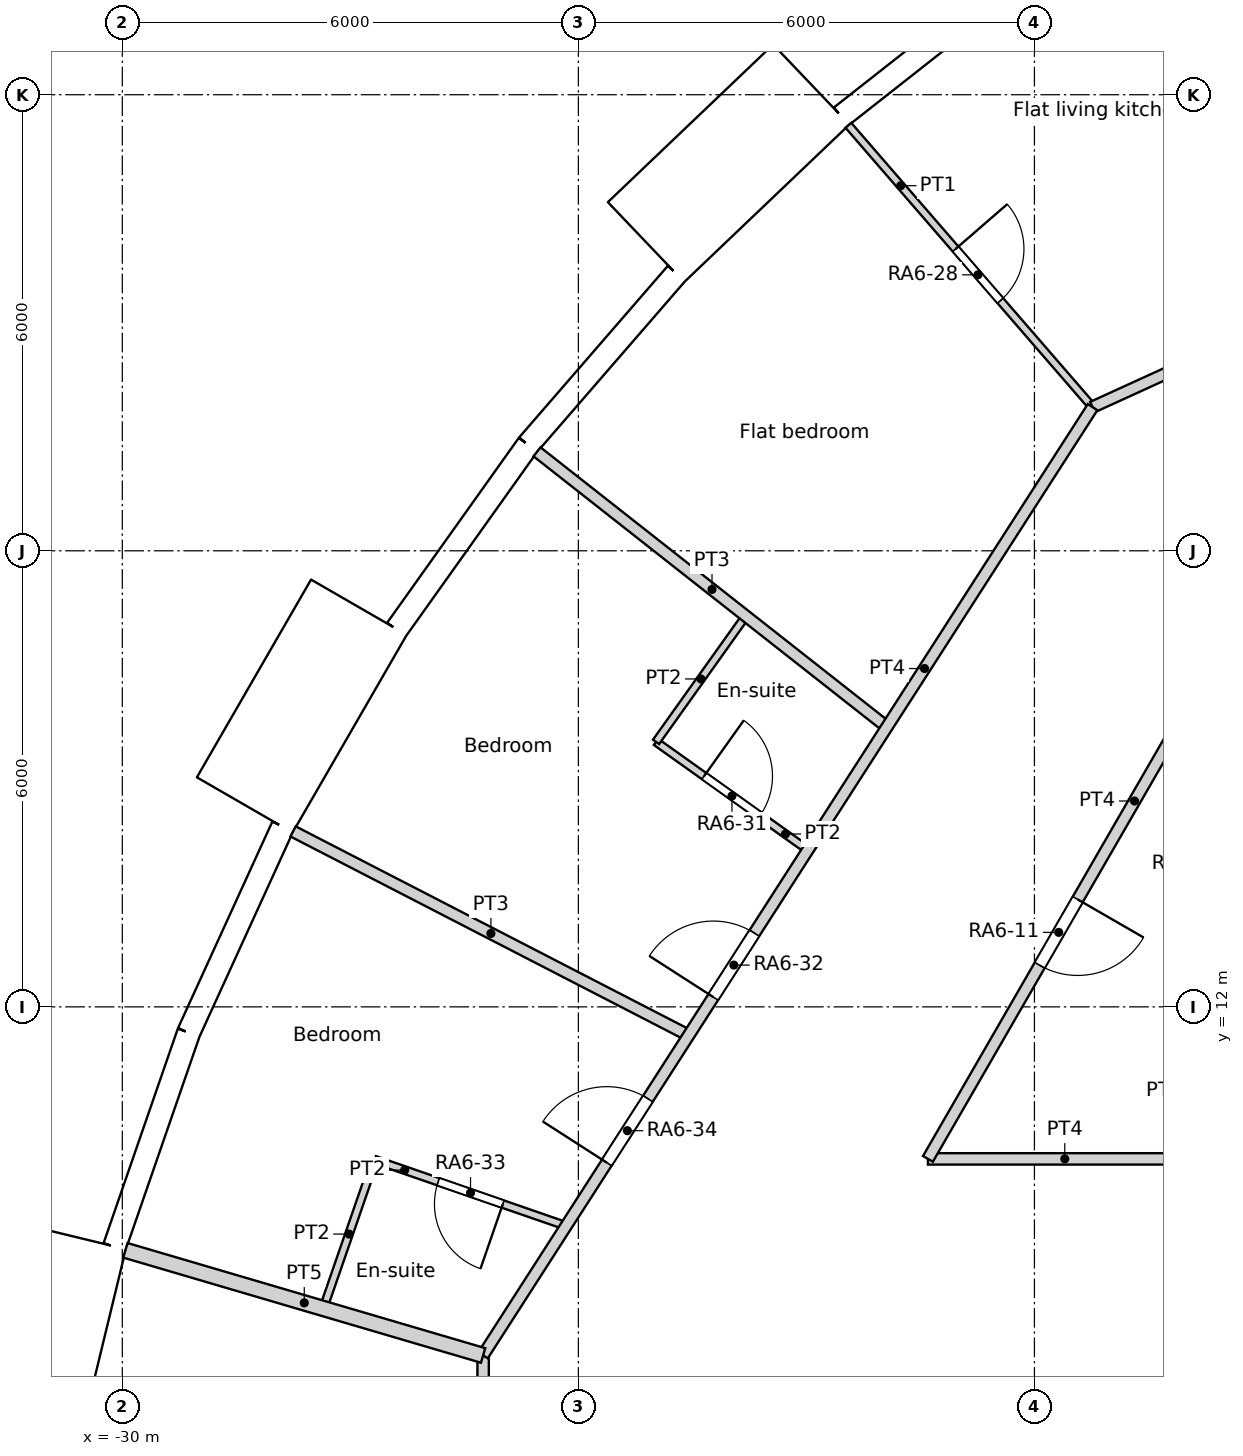
"""IFC4 building model, lengths in metres.
Left out: names, types, materials, properties, quantities, classifications, styles, units other than length and angle.
Written with IfcOpenShell. Run it as: python <this file> out.ifc"""

import sys

from ifc_helpers import new_model, si_unit, direction, frame, frame_2d, origin, origin_2d, place, context, subcontext, project, spatial, rectangle, circle, extrude, element, fill, save


model = new_model("IFC4")
c1 = context("Model", 3, precision=1e-05, world=origin(), true_north=direction((0.0, 1.0)))
c2 = subcontext(c1, "Body", "Model", "MODEL_VIEW")
j1 = project(units=[si_unit("LENGTHUNIT", "METRE"), si_unit("PLANEANGLEUNIT", "RADIAN")], contexts=[c1])
p1 = place(None, origin())
s1 = spatial("IfcSite", under=j1, at=p1, CompositionType="ELEMENT")
p2 = place(p1, origin())
s2 = spatial("IfcBuilding", under=s1, at=p2, CompositionType="ELEMENT")
p3 = place(p2, frame((0.0, 0.0, 82.2)))
s3 = spatial("IfcBuildingStorey", under=s2, at=p3, CompositionType="ELEMENT", Elevation=82.2)
for number, where, z_axis, x_axis in (
    (1, (-19.826, 22.88, 0.0), (0.0, 0.0, 1.0), (1.0, 0.0, 0.0)),
    (2, (-23.797, 18.715, 0.0), (0.0, 0.0, 1.0), (1.0, 0.0, 0.0)),
    (3, (-26.909, 13.873, 0.0), (0.0, 0.0, 1.0), (1.0, 0.0, 0.0)),
    (4, (-29.048, 8.529, 0.0), (0.0, 0.0, 1.0), (1.0, 0.0, 0.0)),
):
    element("IfcColumn", number, at=place(p3, frame(where, z_axis=z_axis, x_axis=x_axis)), inside=s3, PredefinedType="COLUMN", context=c2, shape_type="SweptSolid", body=[
        extrude(circle(Radius=0.6, at=origin_2d()), origin(), (0.0, 0.0, 1.0), 3.6),
    ])
for number, where, z_axis, x_axis in (
    (5, (-16.846, 17.855, 0.0), (0.0, 0.0, 1.0), (1.0, 0.0, 0.0)),
    (6, (-20.509, 13.489, 0.0), (0.0, 0.0, 1.0), (1.0, 0.0, 0.0)),
    (7, (-23.067, 8.396, 0.0), (0.0, 0.0, 1.0), (1.0, 0.0, 0.0)),
):
    element("IfcColumn", number, at=place(p3, frame(where, z_axis=z_axis, x_axis=x_axis)), inside=s3, PredefinedType="COLUMN", context=c2, shape_type="SweptSolid", body=[
        extrude(circle(Radius=0.65, at=origin_2d()), origin(), (0.0, 0.0, 1.0), 3.6),
    ])
p4 = place(p3, frame((-16.958, 8.167, 0.0), z_axis=(0.0, 0.0, 1.0), x_axis=(1.0, 0.0, 0.0)))
e8 = element("IfcColumn", 8, at=p4, inside=s3, PredefinedType="COLUMN", context=c2, shape_type="SweptSolid", body=[
    extrude(circle(Radius=0.7, at=origin_2d()), origin(), (0.0, 0.0, 1.0), 3.6),
])
p5 = place(p3, frame((-18.199, 25.557, 0.0), z_axis=(0.0, 0.0, 1.0), x_axis=(-0.786053834673, -0.618158045322, 0.0)))
e9 = element("IfcWall", 9, at=p5, inside=s3, PredefinedType="SOLIDWALL", context=c2, shape_type="SweptSolid", body=[
    extrude(rectangle(XDim=2.979, YDim=0.3, at=frame_2d((1.49, 0.0))), origin(), (0.0, 0.0, 1.0), 3.15),
])
p6 = place(p5, frame((1.49, 0.0, 1.55)))
e10 = element("IfcOpeningElement", 10, at=p6, cuts=e9, PredefinedType="OPENING", context=c2, shape_type="SweptSolid", body=[
    extrude(circle(Radius=0.9, at=origin_2d()), frame((0.0, 0.16, 0.0), z_axis=(0.0, -1.0, 0.0), x_axis=(1.0, 0.0, 0.0)), (0.0, 0.0, 1.0), 0.32),
])
p7 = place(p3, frame((-20.938, 24.132, -0.45), z_axis=(0.0, 0.0, 1.0), x_axis=(-0.723712023899, -0.690102098579, 0.0)))
e11 = element("IfcWall", 11, at=p7, inside=s3, PredefinedType="ELEMENTEDWALL", context=c2, shape_type="SweptSolid", body=[
    extrude(rectangle(XDim=3.0, YDim=1.45, at=frame_2d((1.5, 0.0))), origin(), (0.0, 0.0, 1.0), 3.6),
])
p8 = place(p7, frame((1.5, 0.0, 2.0)))
e12 = element("IfcOpeningElement", 12, at=p8, cuts=e11, PredefinedType="OPENING", context=c2, shape_type="SweptSolid", body=[
    extrude(circle(Radius=0.9, at=origin_2d()), frame((0.0, 0.735, 0.0), z_axis=(0.0, -1.0, 0.0), x_axis=(1.0, 0.0, 0.0)), (0.0, 0.0, 1.0), 1.47),
])
p9 = place(p3, frame((-22.711, 21.646, 0.0), z_axis=(0.0, 0.0, 1.0), x_axis=(-0.654830712471, -0.755775587066, 0.0)))
e13 = element("IfcWall", 13, at=p9, inside=s3, PredefinedType="SOLIDWALL", context=c2, shape_type="SweptSolid", body=[
    extrude(rectangle(XDim=2.98, YDim=0.3, at=frame_2d((1.49, 0.0))), origin(), (0.0, 0.0, 1.0), 3.15),
])
p10 = place(p9, frame((1.49, 0.0, 1.55)))
e14 = element("IfcOpeningElement", 14, at=p10, cuts=e13, PredefinedType="OPENING", context=c2, shape_type="SweptSolid", body=[
    extrude(circle(Radius=0.9, at=origin_2d()), frame((0.0, 0.16, 0.0), z_axis=(0.0, -1.0, 0.0), x_axis=(1.0, 0.0, 0.0)), (0.0, 0.0, 1.0), 0.32),
])
p11 = place(p3, frame((-24.662, 19.394, 0.0), z_axis=(0.0, 0.0, 1.0), x_axis=(-0.580113774115, -0.814535456, 0.0)))
e15 = element("IfcWall", 15, at=p11, inside=s3, PredefinedType="SOLIDWALL", context=c2, shape_type="SweptSolid", body=[
    extrude(rectangle(XDim=2.98, YDim=0.3, at=frame_2d((1.49, 0.0))), origin(), (0.0, 0.0, 1.0), 3.15),
])
p12 = place(p11, frame((1.49, 0.0, 1.55)))
e16 = element("IfcOpeningElement", 16, at=p12, cuts=e15, PredefinedType="OPENING", context=c2, shape_type="SweptSolid", body=[
    extrude(circle(Radius=0.9, at=origin_2d()), frame((0.0, 0.16, 0.0), z_axis=(0.0, -1.0, 0.0), x_axis=(1.0, 0.0, 0.0)), (0.0, 0.0, 1.0), 0.32),
])
p13 = place(p3, frame((-26.888, 17.256, -0.45), z_axis=(0.0, 0.0, 1.0), x_axis=(-0.499990139034, -0.866031096941, 0.0)))
e17 = element("IfcWall", 17, at=p13, inside=s3, PredefinedType="ELEMENTEDWALL", context=c2, shape_type="SweptSolid", body=[
    extrude(rectangle(XDim=3.0, YDim=1.45, at=frame_2d((1.5, 0.0))), origin(), (0.0, 0.0, 1.0), 3.6),
])
p14 = place(p13, frame((1.5, 0.0, 2.0)))
e18 = element("IfcOpeningElement", 18, at=p14, cuts=e17, PredefinedType="OPENING", context=c2, shape_type="SweptSolid", body=[
    extrude(circle(Radius=0.9, at=origin_2d()), frame((0.0, 0.735, 0.0), z_axis=(0.0, -1.0, 0.0), x_axis=(1.0, 0.0, 0.0)), (0.0, 0.0, 1.0), 1.47),
])
p15 = place(p3, frame((-27.889, 14.371, 0.0), z_axis=(0.0, 0.0, 1.0), x_axis=(-0.415407317162, -0.909635509888, 0.0)))
e19 = element("IfcWall", 19, at=p15, inside=s3, PredefinedType="SOLIDWALL", context=c2, shape_type="SweptSolid", body=[
    extrude(rectangle(XDim=2.98, YDim=0.3, at=frame_2d((1.49, 0.0))), origin(), (0.0, 0.0, 1.0), 3.15),
])
p16 = place(p15, frame((1.49, 0.0, 1.55)))
e20 = element("IfcOpeningElement", 20, at=p16, cuts=e19, PredefinedType="OPENING", context=c2, shape_type="SweptSolid", body=[
    extrude(circle(Radius=0.9, at=origin_2d()), frame((0.0, 0.16, 0.0), z_axis=(0.0, -1.0, 0.0), x_axis=(1.0, 0.0, 0.0)), (0.0, 0.0, 1.0), 0.32),
])
p17 = place(p3, frame((-29.127, 11.661, 0.0), z_axis=(0.0, 0.0, 1.0), x_axis=(-0.327096492592, -0.944990944154, 0.0)))
e21 = element("IfcWall", 21, at=p17, inside=s3, PredefinedType="SOLIDWALL", context=c2, shape_type="SweptSolid", body=[
    extrude(rectangle(XDim=2.979, YDim=0.3, at=frame_2d((1.49, 0.0))), origin(), (0.0, 0.0, 1.0), 3.15),
])
p18 = place(p17, frame((1.49, 0.0, 1.55)))
e22 = element("IfcOpeningElement", 22, at=p18, cuts=e21, PredefinedType="OPENING", context=c2, shape_type="SweptSolid", body=[
    extrude(circle(Radius=0.9, at=origin_2d()), frame((0.0, 0.16, 0.0), z_axis=(0.0, -1.0, 0.0), x_axis=(1.0, 0.0, 0.0)), (0.0, 0.0, 1.0), 0.32),
])
p19 = place(p3, frame((-30.661, 8.982, -0.45), z_axis=(0.0, 0.0, 1.0), x_axis=(-0.235751415068, -0.971813392732, 0.0)))
e23 = element("IfcWall", 23, at=p19, inside=s3, PredefinedType="ELEMENTEDWALL", context=c2, shape_type="SweptSolid", body=[
    extrude(rectangle(XDim=3.0, YDim=1.45, at=frame_2d((1.5, 0.0))), origin(), (0.0, 0.0, 1.0), 3.6),
])
p20 = place(p19, frame((1.5, 0.0, 2.0)))
e24 = element("IfcOpeningElement", 24, at=p20, cuts=e23, PredefinedType="OPENING", context=c2, shape_type="SweptSolid", body=[
    extrude(circle(Radius=0.9, at=origin_2d()), frame((0.0, 0.735, 0.0), z_axis=(0.0, -1.0, 0.0), x_axis=(1.0, 0.0, 0.0)), (0.0, 0.0, 1.0), 1.47),
])
p21 = place(p3, frame((-17.236, 19.891, 0.0), z_axis=(0.0, 0.0, 1.0), x_axis=(0.909645678785, 0.415385049163, 0.0)))
e25 = element("IfcWall", 25, at=p21, inside=s3, PredefinedType="PARTITIONING", context=c2, shape_type="SweptSolid", body=[
    extrude(rectangle(XDim=14.829, YDim=0.15, at=frame_2d((7.415, 0.0))), origin(), (0.0, 0.0, 1.0), 3.15),
])
p22 = place(p21, frame((11.569, 0.0, 0.0)))
e26 = element("IfcOpeningElement", 26, at=p22, cuts=e25, PredefinedType="OPENING", context=c2, shape_type="SweptSolid", body=[
    extrude(rectangle(XDim=1.0, YDim=2.1, at=frame_2d((0.5, 1.05))), frame((0.0, 0.075, 0.0), z_axis=(0.0, -1.0, 0.0), x_axis=(1.0, 0.0, 0.0)), (0.0, 0.0, 1.0), 0.15),
])
p23 = place(p21, frame((1.134, 0.0, 0.0)))
e27 = element("IfcOpeningElement", 27, at=p23, cuts=e25, PredefinedType="OPENING", context=c2, shape_type="SweptSolid", body=[
    extrude(rectangle(XDim=1.0, YDim=2.1, at=frame_2d((0.5, 1.05))), frame((0.0, 0.075, 0.0), z_axis=(0.0, -1.0, 0.0), x_axis=(1.0, 0.0, 0.0)), (0.0, 0.0, 1.0), 0.15),
])
p24 = place(p3, frame((-25.255, 7.416, 0.0), z_axis=(0.0, 0.0, 1.0), x_axis=(0.540805851332, 0.841147449123, 0.0)))
e28 = element("IfcWall", 28, at=p24, inside=s3, PredefinedType="PARTITIONING", context=c2, shape_type="SweptSolid", body=[
    extrude(rectangle(XDim=14.829, YDim=0.15, at=frame_2d((7.415, 0.0))), origin(), (0.0, 0.0, 1.0), 3.15),
])
p25 = place(p24, frame((5.603, 0.0, 0.0)))
e29 = element("IfcOpeningElement", 29, at=p25, cuts=e28, PredefinedType="OPENING", context=c2, shape_type="SweptSolid", body=[
    extrude(rectangle(XDim=1.0, YDim=2.1, at=frame_2d((0.5, 1.05))), frame((0.0, 0.075, 0.0), z_axis=(0.0, -1.0, 0.0), x_axis=(1.0, 0.0, 0.0)), (0.0, 0.0, 1.0), 0.15),
])
p26 = place(p24, frame((3.013, 0.0, 0.0)))
e30 = element("IfcOpeningElement", 30, at=p26, cuts=e28, PredefinedType="OPENING", context=c2, shape_type="SweptSolid", body=[
    extrude(rectangle(XDim=1.0, YDim=2.1, at=frame_2d((0.5, 1.05))), frame((0.0, 0.075, 0.0), z_axis=(0.0, -1.0, 0.0), x_axis=(1.0, 0.0, 0.0)), (0.0, 0.0, 1.0), 0.15),
])
p27 = place(p3, frame((-19.401, 10.0, 0.0), z_axis=(0.0, 0.0, 1.0), x_axis=(0.499992689227, 0.86602962462, 0.0)))
e31 = element("IfcWall", 31, at=p27, inside=s3, PredefinedType="PARTITIONING", context=c2, shape_type="SweptSolid", body=[
    extrude(rectangle(XDim=6.882, YDim=0.15, at=frame_2d((3.441, 0.0))), origin(), (0.0, 0.0, 1.0), 3.15),
])
p28 = place(p27, frame((2.941, 0.0, 0.0)))
e32 = element("IfcOpeningElement", 32, at=p28, cuts=e31, PredefinedType="OPENING", context=c2, shape_type="SweptSolid", body=[
    extrude(rectangle(XDim=1.0, YDim=2.04, at=frame_2d((0.5, 1.02))), frame((0.0, 0.075, 0.0), z_axis=(0.0, -1.0, 0.0), x_axis=(1.0, 0.0, 0.0)), (0.0, 0.0, 1.0), 0.15),
])
p29 = place(p3, frame((-19.401, 10.0, 0.0), z_axis=(0.0, 0.0, 1.0), x_axis=(1.0, 0.0, 0.0)))
e33 = element("IfcWall", 33, at=p29, inside=s3, PredefinedType="PARTITIONING", context=c2, shape_type="SweptSolid", body=[
    extrude(rectangle(XDim=3.601, YDim=0.15, at=frame_2d((1.8, 0.0))), origin(), (0.0, 0.0, 1.0), 3.15),
])
p30 = place(p3, frame((-25.253, -7.415, 0.0), z_axis=(0.0, 0.0, 1.0), x_axis=(0.0, 1.0, 0.0)))
e34 = element("IfcWall", 34, at=p30, inside=s3, PredefinedType="PARTITIONING", context=c2, shape_type="SweptSolid", body=[
    extrude(rectangle(XDim=14.83, YDim=0.15, at=frame_2d((7.415, 0.0))), origin(), (0.0, 0.0, 1.0), 3.15),
])
p31 = place(p30, frame((6.665, 0.0, 0.0)))
e35 = element("IfcOpeningElement", 35, at=p31, cuts=e34, PredefinedType="OPENING", context=c2, shape_type="SweptSolid", body=[
    extrude(rectangle(XDim=1.5, YDim=2.1, at=frame_2d((0.75, 1.05))), frame((0.0, 0.075, 0.0), z_axis=(0.0, -1.0, 0.0), x_axis=(1.0, 0.0, 0.0)), (0.0, 0.0, 1.0), 0.15),
])
p32 = place(p3, frame((-20.448, 23.598, 0.0), z_axis=(0.0, 0.0, 1.0), x_axis=(0.654847179409, -0.755761319214, 0.0)))
e36 = element("IfcWall", 36, at=p32, inside=s3, PredefinedType="PARTITIONING", context=c2, shape_type="SweptSolid", body=[
    extrude(rectangle(XDim=4.906, YDim=0.1, at=frame_2d((2.453, 0.0))), origin(), (0.0, 0.0, 1.0), 3.15),
])
p33 = place(p32, frame((2.153, 0.0, 0.0)))
e37 = element("IfcOpeningElement", 37, at=p33, cuts=e36, PredefinedType="OPENING", context=c2, shape_type="SweptSolid", body=[
    extrude(rectangle(XDim=0.9, YDim=2.1, at=frame_2d((0.45, 1.05))), frame((0.0, 0.05, 0.0), z_axis=(0.0, -1.0, 0.0), x_axis=(1.0, 0.0, 0.0)), (0.0, 0.0, 1.0), 0.1),
])
p34 = place(p3, frame((-24.544, 19.302, 0.0), z_axis=(0.0, 0.0, 1.0), x_axis=(0.786034767432, -0.618182290581, 0.0)))
e38 = element("IfcWall", 38, at=p34, inside=s3, PredefinedType="PARTITIONING", context=c2, shape_type="SweptSolid", body=[
    extrude(rectangle(XDim=5.857, YDim=0.15, at=frame_2d((2.929, 0.0))), origin(), (0.0, 0.0, 1.0), 3.15),
])
p35 = place(p3, frame((-22.978, 15.486, 0.0), z_axis=(0.0, 0.0, 1.0), x_axis=(0.580283748447, 0.814414373208, 0.0)))
e39 = element("IfcWall", 39, at=p35, inside=s3, PredefinedType="PARTITIONING", context=c2, shape_type="SweptSolid", body=[
    extrude(rectangle(XDim=2.033, YDim=0.1, at=frame_2d((1.017, 0.0))), origin(), (0.0, 0.0, 1.0), 3.15),
])
p36 = place(p3, frame((-22.978, 15.486, 0.0), z_axis=(0.0, 0.0, 1.0), x_axis=(0.814519517834, -0.580136152181, 0.0)))
e40 = element("IfcWall", 40, at=p36, inside=s3, PredefinedType="PARTITIONING", context=c2, shape_type="SweptSolid", body=[
    extrude(rectangle(XDim=2.453, YDim=0.1, at=frame_2d((1.227, 0.0))), origin(), (0.0, 0.0, 1.0), 3.15),
])
p37 = place(p36, frame((0.776, 0.0, 0.0)))
e41 = element("IfcOpeningElement", 41, at=p37, cuts=e40, PredefinedType="OPENING", context=c2, shape_type="SweptSolid", body=[
    extrude(rectangle(XDim=0.9, YDim=2.04, at=frame_2d((0.45, 1.02))), frame((0.0, 0.05, 0.0), z_axis=(0.0, -1.0, 0.0), x_axis=(1.0, 0.0, 0.0)), (0.0, 0.0, 1.0), 0.1),
])
p38 = place(p3, frame((-27.753, 14.308, 0.0), z_axis=(0.0, 0.0, 1.0), x_axis=(0.88877955153, -0.45833493079, 0.0)))
e42 = element("IfcWall", 42, at=p38, inside=s3, PredefinedType="PARTITIONING", context=c2, shape_type="SweptSolid", body=[
    extrude(rectangle(XDim=5.856, YDim=0.15, at=frame_2d((2.928, 0.0))), origin(), (0.0, 0.0, 1.0), 3.15),
])
p39 = place(p3, frame((-26.679, 9.989, 0.0), z_axis=(0.0, 0.0, 1.0), x_axis=(0.945014370431, -0.327028805578, 0.0)))
e43 = element("IfcWall", 43, at=p39, inside=s3, PredefinedType="PARTITIONING", context=c2, shape_type="SweptSolid", body=[
    extrude(rectangle(XDim=2.667, YDim=0.1, at=frame_2d((1.333, 0.0))), origin(), (0.0, 0.0, 1.0), 3.15),
])
p40 = place(p39, frame((0.884, 0.0, 0.0)))
e44 = element("IfcOpeningElement", 44, at=p40, cuts=e43, PredefinedType="OPENING", context=c2, shape_type="SweptSolid", body=[
    extrude(rectangle(XDim=0.9, YDim=2.04, at=frame_2d((0.45, 1.02))), frame((0.0, 0.05, 0.0), z_axis=(0.0, -1.0, 0.0), x_axis=(1.0, 0.0, 0.0)), (0.0, 0.0, 1.0), 0.1),
])
p41 = place(p3, frame((-27.356, 8.032, 0.0), z_axis=(0.0, 0.0, 1.0), x_axis=(0.326924291943, 0.945050531632, 0.0)))
e45 = element("IfcWall", 45, at=p41, inside=s3, PredefinedType="PARTITIONING", context=c2, shape_type="SweptSolid", body=[
    extrude(rectangle(XDim=2.071, YDim=0.1, at=frame_2d((1.035, 0.0))), origin(), (0.0, 0.0, 1.0), 3.15),
])
p42 = place(p3, frame((-29.959, 8.797, 0.0), z_axis=(0.0, 0.0, 1.0), x_axis=(0.95941700717, -0.281991145876, 0.0)))
e46 = element("IfcWall", 46, at=p42, inside=s3, PredefinedType="PARTITIONING", context=c2, shape_type="SweptSolid", body=[
    extrude(rectangle(XDim=4.905, YDim=0.2, at=frame_2d((2.452, 0.0))), origin(), (0.0, 0.0, 1.0), 3.15),
])
p43 = place(p6, origin())
e47 = element("IfcWindow", 47, at=p43, inside=s3, PartitioningType="SINGLE_PANEL", PredefinedType="WINDOW", context=c2, shape_type="SweptSolid", body=[
    extrude(circle(Radius=0.9, at=origin_2d()), frame((0.0, 0.12, 0.0), z_axis=(0.0, -1.0, 0.0), x_axis=(1.0, 0.0, 0.0)), (0.0, 0.0, 1.0), 0.1),
])
fill(e10, e47)
p44 = place(p8, origin())
e48 = element("IfcWindow", 48, at=p44, inside=s3, PartitioningType="SINGLE_PANEL", PredefinedType="WINDOW", context=c2, shape_type="SweptSolid", body=[
    extrude(circle(Radius=0.9, at=origin_2d()), frame((0.0, 0.695, 0.0), z_axis=(0.0, -1.0, 0.0), x_axis=(1.0, 0.0, 0.0)), (0.0, 0.0, 1.0), 0.1),
])
fill(e12, e48)
p45 = place(p10, origin())
e49 = element("IfcWindow", 49, at=p45, inside=s3, PartitioningType="SINGLE_PANEL", PredefinedType="WINDOW", context=c2, shape_type="SweptSolid", body=[
    extrude(circle(Radius=0.9, at=origin_2d()), frame((0.0, 0.12, 0.0), z_axis=(0.0, -1.0, 0.0), x_axis=(1.0, 0.0, 0.0)), (0.0, 0.0, 1.0), 0.1),
])
fill(e14, e49)
p46 = place(p12, origin())
e50 = element("IfcWindow", 50, at=p46, inside=s3, PartitioningType="SINGLE_PANEL", PredefinedType="WINDOW", context=c2, shape_type="SweptSolid", body=[
    extrude(circle(Radius=0.9, at=origin_2d()), frame((0.0, 0.12, 0.0), z_axis=(0.0, -1.0, 0.0), x_axis=(1.0, 0.0, 0.0)), (0.0, 0.0, 1.0), 0.1),
])
fill(e16, e50)
p47 = place(p14, origin())
e51 = element("IfcWindow", 51, at=p47, inside=s3, PartitioningType="SINGLE_PANEL", PredefinedType="WINDOW", context=c2, shape_type="SweptSolid", body=[
    extrude(circle(Radius=0.9, at=origin_2d()), frame((0.0, 0.695, 0.0), z_axis=(0.0, -1.0, 0.0), x_axis=(1.0, 0.0, 0.0)), (0.0, 0.0, 1.0), 0.1),
])
fill(e18, e51)
p48 = place(p16, origin())
e52 = element("IfcWindow", 52, at=p48, inside=s3, PartitioningType="SINGLE_PANEL", PredefinedType="WINDOW", context=c2, shape_type="SweptSolid", body=[
    extrude(circle(Radius=0.9, at=origin_2d()), frame((0.0, 0.12, 0.0), z_axis=(0.0, -1.0, 0.0), x_axis=(1.0, 0.0, 0.0)), (0.0, 0.0, 1.0), 0.1),
])
fill(e20, e52)
p49 = place(p18, origin())
e53 = element("IfcWindow", 53, at=p49, inside=s3, PartitioningType="SINGLE_PANEL", PredefinedType="WINDOW", context=c2, shape_type="SweptSolid", body=[
    extrude(circle(Radius=0.9, at=origin_2d()), frame((0.0, 0.12, 0.0), z_axis=(0.0, -1.0, 0.0), x_axis=(1.0, 0.0, 0.0)), (0.0, 0.0, 1.0), 0.1),
])
fill(e22, e53)
p50 = place(p20, origin())
e54 = element("IfcWindow", 54, at=p50, inside=s3, PartitioningType="SINGLE_PANEL", PredefinedType="WINDOW", context=c2, shape_type="SweptSolid", body=[
    extrude(circle(Radius=0.9, at=origin_2d()), frame((0.0, 0.695, 0.0), z_axis=(0.0, -1.0, 0.0), x_axis=(1.0, 0.0, 0.0)), (0.0, 0.0, 1.0), 0.1),
])
fill(e24, e54)
p51 = place(p28, origin())
e55 = element("IfcDoor", 55, at=p51, inside=s3, OperationType="SINGLE_SWING_LEFT", PredefinedType="DOOR", context=c2, shape_type="SweptSolid", body=[
    extrude(rectangle(XDim=1.0, YDim=2.04, at=frame_2d((0.5, 1.02))), frame((0.0, 0.025, 0.0), z_axis=(0.0, -1.0, 0.0), x_axis=(1.0, 0.0, 0.0)), (0.0, 0.0, 1.0), 0.05),
])
fill(e32, e55)
p52 = place(p33, origin())
e56 = element("IfcDoor", 56, at=p52, inside=s3, OperationType="SINGLE_SWING_LEFT", PredefinedType="DOOR", context=c2, shape_type="SweptSolid", body=[
    extrude(rectangle(XDim=0.9, YDim=2.1, at=frame_2d((0.45, 1.05))), frame((0.0, 0.025, 0.0), z_axis=(0.0, -1.0, 0.0), x_axis=(1.0, 0.0, 0.0)), (0.0, 0.0, 1.0), 0.05),
])
fill(e37, e56)
p53 = place(p37, origin())
e57 = element("IfcDoor", 57, at=p53, inside=s3, OperationType="SINGLE_SWING_LEFT", PredefinedType="DOOR", context=c2, shape_type="SweptSolid", body=[
    extrude(rectangle(XDim=0.9, YDim=2.04, at=frame_2d((0.45, 1.02))), frame((0.0, 0.025, 0.0), z_axis=(0.0, -1.0, 0.0), x_axis=(1.0, 0.0, 0.0)), (0.0, 0.0, 1.0), 0.05),
])
fill(e41, e57)
p54 = place(p25, origin())
e58 = element("IfcDoor", 58, at=p54, inside=s3, OperationType="SINGLE_SWING_LEFT", PredefinedType="DOOR", context=c2, shape_type="SweptSolid", body=[
    extrude(rectangle(XDim=1.0, YDim=2.1, at=frame_2d((0.5, 1.05))), frame((0.0, 0.025, 0.0), z_axis=(0.0, -1.0, 0.0), x_axis=(1.0, 0.0, 0.0)), (0.0, 0.0, 1.0), 0.05),
])
fill(e29, e58)
p55 = place(p40, origin())
e59 = element("IfcDoor", 59, at=p55, inside=s3, OperationType="SINGLE_SWING_LEFT", PredefinedType="DOOR", context=c2, shape_type="SweptSolid", body=[
    extrude(rectangle(XDim=0.9, YDim=2.04, at=frame_2d((0.45, 1.02))), frame((0.0, 0.025, 0.0), z_axis=(0.0, -1.0, 0.0), x_axis=(1.0, 0.0, 0.0)), (0.0, 0.0, 1.0), 0.05),
])
fill(e44, e59)
p56 = place(p26, origin())
e60 = element("IfcDoor", 60, at=p56, inside=s3, OperationType="SINGLE_SWING_LEFT", PredefinedType="DOOR", context=c2, shape_type="SweptSolid", body=[
    extrude(rectangle(XDim=1.0, YDim=2.1, at=frame_2d((0.5, 1.05))), frame((0.0, 0.025, 0.0), z_axis=(0.0, -1.0, 0.0), x_axis=(1.0, 0.0, 0.0)), (0.0, 0.0, 1.0), 0.05),
])
fill(e30, e60)
save(model, sys.argv[1])
